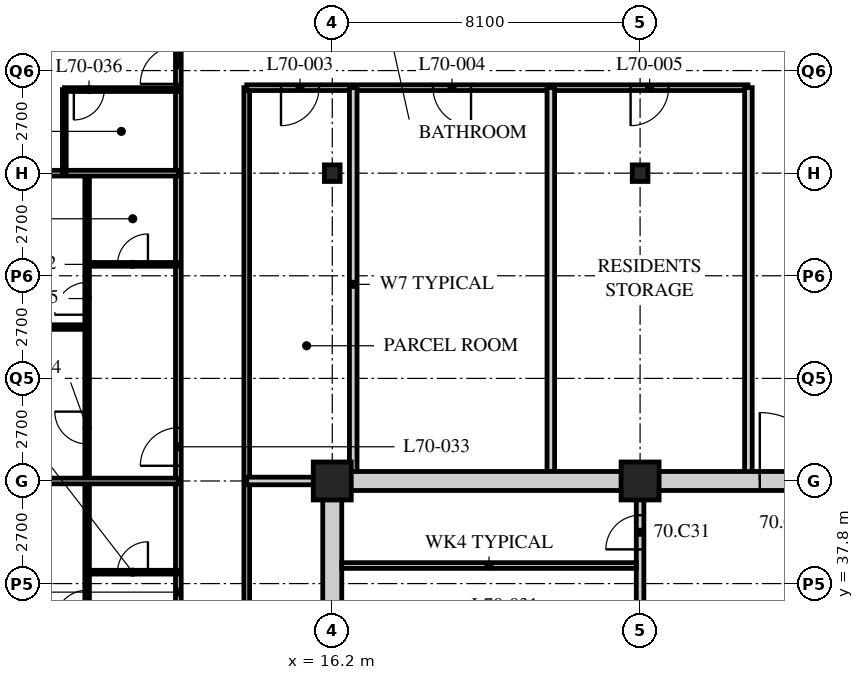
"""IFC4 building model, lengths in metres.
Left out: names, types, materials, properties, quantities, classifications, styles, units other than length and angle.
Written with IfcOpenShell. Run it as: python <this file> out.ifc"""

import sys

from ifc_helpers import new_model, si_unit, direction, frame, frame_2d, origin, origin_2d, place, context, subcontext, project, spatial, rectangle, hollow_rectangle, i_section, extrude, element, fill, save


model = new_model("IFC4")
c1 = context("Model", 3, precision=1e-05, world=origin(), true_north=direction((0.0, 1.0)))
c2 = subcontext(c1, "Body", "Model", "MODEL_VIEW")
j1 = project(units=[si_unit("LENGTHUNIT", "METRE"), si_unit("PLANEANGLEUNIT", "RADIAN")], contexts=[c1])
p1 = place(None, origin())
s1 = spatial("IfcSite", under=j1, at=p1, CompositionType="ELEMENT")
p2 = place(p1, origin())
s2 = spatial("IfcBuilding", under=s1, at=p2, CompositionType="ELEMENT")
p3 = place(p2, frame((0.0, 0.0, 273.6)))
s3 = spatial("IfcBuildingStorey", under=s2, at=p3, CompositionType="ELEMENT", Elevation=273.6)
p4 = place(p3, frame((16.2, 40.5, 0.0), z_axis=(0.0, 0.0, 1.0), x_axis=(1.0, 0.0, 0.0)))
e1 = element("IfcColumn", 1, at=p4, inside=s3, PredefinedType="COLUMN", context=c2, shape_type="SweptSolid", body=[
    extrude(hollow_rectangle(XDim=1.0, YDim=1.0, WallThickness=0.1, at=origin_2d()), origin(), (0.0, 0.0, 1.0), 3.9),
])
p5 = place(p3, frame((16.2, 48.6, 0.0), z_axis=(0.0, 0.0, 1.0), x_axis=(1.0, 0.0, 0.0)))
e2 = element("IfcColumn", 2, at=p5, inside=s3, PredefinedType="COLUMN", context=c2, shape_type="SweptSolid", body=[
    extrude(i_section(OverallWidth=0.412, OverallDepth=0.437, WebThickness=0.036, FlangeThickness=0.058, FilletRadius=0.015, at=origin_2d()), origin(), (0.0, 0.0, 1.0), 3.9),
])
p6 = place(p3, frame((24.3, 40.5, 0.0), z_axis=(0.0, 0.0, 1.0), x_axis=(1.0, 0.0, 0.0)))
e3 = element("IfcColumn", 3, at=p6, inside=s3, PredefinedType="COLUMN", context=c2, shape_type="SweptSolid", body=[
    extrude(hollow_rectangle(XDim=1.0, YDim=1.0, WallThickness=0.1, at=origin_2d()), origin(), (0.0, 0.0, 1.0), 3.9),
])
p7 = place(p3, frame((24.3, 48.6, 0.0), z_axis=(0.0, 0.0, 1.0), x_axis=(1.0, 0.0, 0.0)))
e4 = element("IfcColumn", 4, at=p7, inside=s3, PredefinedType="COLUMN", context=c2, shape_type="SweptSolid", body=[
    extrude(i_section(OverallWidth=0.412, OverallDepth=0.437, WebThickness=0.036, FlangeThickness=0.058, FilletRadius=0.015, at=origin_2d()), origin(), (0.0, 0.0, 1.0), 3.9),
])
p8 = place(p3, frame((12.15, 22.5, 0.0), z_axis=(0.0, 0.0, 1.0), x_axis=(0.0, 1.0, 0.0)))
e5 = element("IfcWall", 5, at=p8, inside=s3, PredefinedType="PARTITIONING", context=c2, shape_type="SweptSolid", body=[
    extrude(rectangle(XDim=30.15, YDim=0.15, at=frame_2d((15.075, 0.0))), origin(), (0.0, 0.0, 1.0), 3.69),
])
p9 = place(p8, frame((0.4, 0.0, 0.0)))
e6 = element("IfcOpeningElement", 6, at=p9, cuts=e5, PredefinedType="OPENING", context=c2, shape_type="SweptSolid", body=[
    extrude(rectangle(XDim=1.0, YDim=2.1, at=frame_2d((0.5, 1.05))), frame((0.0, 0.085, 0.0), z_axis=(0.0, -1.0, 0.0), x_axis=(1.0, 0.0, 0.0)), (0.0, 0.0, 1.0), 0.17),
])
p10 = place(p8, frame((18.4, 0.0, 0.0)))
e7 = element("IfcOpeningElement", 7, at=p10, cuts=e5, PredefinedType="OPENING", context=c2, shape_type="SweptSolid", body=[
    extrude(rectangle(XDim=1.0, YDim=2.1, at=frame_2d((0.5, 1.05))), frame((0.0, 0.085, 0.0), z_axis=(0.0, -1.0, 0.0), x_axis=(1.0, 0.0, 0.0)), (0.0, 0.0, 1.0), 0.17),
])
p11 = place(p8, frame((28.45, 0.0, 0.0)))
e8 = element("IfcOpeningElement", 8, at=p11, cuts=e5, PredefinedType="OPENING", context=c2, shape_type="SweptSolid", body=[
    extrude(rectangle(XDim=1.0, YDim=2.1, at=frame_2d((0.5, 1.05))), frame((0.0, 0.085, 0.0), z_axis=(0.0, -1.0, 0.0), x_axis=(1.0, 0.0, 0.0)), (0.0, 0.0, 1.0), 0.17),
])
p12 = place(p3, frame((13.95, 24.3, 0.0), z_axis=(0.0, 0.0, 1.0), x_axis=(0.0, 1.0, 0.0)))
e9 = element("IfcWall", 9, at=p12, inside=s3, PredefinedType="PARTITIONING", context=c2, shape_type="SweptSolid", body=[
    extrude(rectangle(XDim=26.55, YDim=0.15, at=frame_2d((13.275, 0.0))), origin(), (0.0, 0.0, 1.0), 3.69),
])
p13 = place(p12, frame((3.55, 0.0, 0.0)))
e10 = element("IfcOpeningElement", 10, at=p13, cuts=e9, PredefinedType="OPENING", context=c2, shape_type="SweptSolid", body=[
    extrude(rectangle(XDim=1.0, YDim=2.1, at=frame_2d((0.5, 1.05))), frame((0.0, 0.085, 0.0), z_axis=(0.0, -1.0, 0.0), x_axis=(1.0, 0.0, 0.0)), (0.0, 0.0, 1.0), 0.17),
])
p14 = place(p12, frame((11.65, 0.0, 0.0)))
e11 = element("IfcOpeningElement", 11, at=p14, cuts=e9, PredefinedType="OPENING", context=c2, shape_type="SweptSolid", body=[
    extrude(rectangle(XDim=1.0, YDim=2.1, at=frame_2d((0.5, 1.05))), frame((0.0, 0.085, 0.0), z_axis=(0.0, -1.0, 0.0), x_axis=(1.0, 0.0, 0.0)), (0.0, 0.0, 1.0), 0.17),
])
p15 = place(p3, frame((13.95, 50.85, 0.0), z_axis=(0.0, 0.0, 1.0), x_axis=(1.0, 0.0, 0.0)))
e12 = element("IfcWall", 12, at=p15, inside=s3, PredefinedType="PARTITIONING", context=c2, shape_type="SweptSolid", body=[
    extrude(rectangle(XDim=13.19, YDim=0.15, at=frame_2d((6.595, 0.0))), origin(), (0.0, 0.0, 1.0), 3.69),
])
p16 = place(p15, frame((0.901, 0.0, 0.0)))
e13 = element("IfcOpeningElement", 13, at=p16, cuts=e12, PredefinedType="OPENING", context=c2, shape_type="SweptSolid", body=[
    extrude(rectangle(XDim=1.0, YDim=2.1, at=frame_2d((0.5, 1.05))), frame((0.0, 0.085, 0.0), z_axis=(0.0, -1.0, 0.0), x_axis=(1.0, 0.0, 0.0)), (0.0, 0.0, 1.0), 0.17),
])
p17 = place(p15, frame((4.901, 0.0, 0.0)))
e14 = element("IfcOpeningElement", 14, at=p17, cuts=e12, PredefinedType="OPENING", context=c2, shape_type="SweptSolid", body=[
    extrude(rectangle(XDim=1.0, YDim=2.1, at=frame_2d((0.5, 1.05))), frame((0.0, 0.085, 0.0), z_axis=(0.0, -1.0, 0.0), x_axis=(1.0, 0.0, 0.0)), (0.0, 0.0, 1.0), 0.17),
])
p18 = place(p15, frame((10.101, 0.0, 0.0)))
e15 = element("IfcOpeningElement", 15, at=p18, cuts=e12, PredefinedType="OPENING", context=c2, shape_type="SweptSolid", body=[
    extrude(rectangle(XDim=1.0, YDim=2.1, at=frame_2d((0.5, 1.05))), frame((0.0, 0.085, 0.0), z_axis=(0.0, -1.0, 0.0), x_axis=(1.0, 0.0, 0.0)), (0.0, 0.0, 1.0), 0.17),
])
for number, where, z_axis, x_axis in (
    (16, (16.752, 50.85, 0.0), (0.0, 0.0, 1.0), (0.0, -1.0, 0.0)),
    (17, (21.951, 50.85, 0.0), (0.0, 0.0, 1.0), (0.0, -1.0, 0.0)),
    (18, (27.15, 40.5, 0.0), (0.0, 0.0, 1.0), (0.0, 1.0, 0.0)),
):
    element("IfcWall", number, at=place(p3, frame(where, z_axis=z_axis, x_axis=x_axis)), inside=s3, PredefinedType="SOLIDWALL", context=c2, shape_type="SweptSolid", body=[
        extrude(rectangle(XDim=10.35, YDim=0.2, at=frame_2d((5.175, 0.0))), origin(), (0.0, 0.0, 1.0), 3.69),
    ])
p19 = place(p3, frame((13.95, 40.5, 0.0), z_axis=(0.0, 0.0, 1.0), x_axis=(1.0, 0.0, 0.0)))
e19 = element("IfcWall", 19, at=p19, inside=s3, PredefinedType="SOLIDWALL", context=c2, shape_type="SweptSolid", body=[
    extrude(rectangle(XDim=2.25, YDim=0.2, at=frame_2d((1.125, 0.0))), origin(), (0.0, 0.0, 1.0), 3.078),
])
p20 = place(p3, frame((9.75, 22.5, 0.0), z_axis=(0.0, 0.0, 1.0), x_axis=(0.0, 1.0, 0.0)))
e20 = element("IfcWall", 20, at=p20, inside=s3, PredefinedType="PARTITIONING", context=c2, shape_type="SweptSolid", body=[
    extrude(rectangle(XDim=26.1, YDim=0.12, at=frame_2d((13.05, 0.0))), origin(), (0.0, 0.0, 1.0), 3.69),
])
p21 = place(p20, frame((0.975, 0.0, 0.0)))
e21 = element("IfcOpeningElement", 21, at=p21, cuts=e20, PredefinedType="OPENING", context=c2, shape_type="SweptSolid", body=[
    extrude(rectangle(XDim=0.85, YDim=2.1, at=frame_2d((0.425, 1.05))), frame((0.0, 0.07, 0.0), z_axis=(0.0, -1.0, 0.0), x_axis=(1.0, 0.0, 0.0)), (0.0, 0.0, 1.0), 0.14),
])
p22 = place(p20, frame((10.225, 0.0, 0.0)))
e22 = element("IfcOpeningElement", 22, at=p22, cuts=e20, PredefinedType="OPENING", context=c2, shape_type="SweptSolid", body=[
    extrude(rectangle(XDim=0.85, YDim=2.1, at=frame_2d((0.425, 1.05))), frame((0.0, 0.07, 0.0), z_axis=(0.0, -1.0, 0.0), x_axis=(1.0, 0.0, 0.0)), (0.0, 0.0, 1.0), 0.14),
])
p23 = place(p20, frame((14.275, 0.0, 0.0)))
e23 = element("IfcOpeningElement", 23, at=p23, cuts=e20, PredefinedType="OPENING", context=c2, shape_type="SweptSolid", body=[
    extrude(rectangle(XDim=0.85, YDim=2.1, at=frame_2d((0.425, 1.05))), frame((0.0, 0.07, 0.0), z_axis=(0.0, -1.0, 0.0), x_axis=(1.0, 0.0, 0.0)), (0.0, 0.0, 1.0), 0.14),
])
p24 = place(p20, frame((18.975, 0.0, 0.0)))
e24 = element("IfcOpeningElement", 24, at=p24, cuts=e20, PredefinedType="OPENING", context=c2, shape_type="SweptSolid", body=[
    extrude(rectangle(XDim=0.85, YDim=2.1, at=frame_2d((0.425, 1.05))), frame((0.0, 0.07, 0.0), z_axis=(0.0, -1.0, 0.0), x_axis=(1.0, 0.0, 0.0)), (0.0, 0.0, 1.0), 0.14),
])
p25 = place(p20, frame((22.375, 0.0, 0.0)))
e25 = element("IfcOpeningElement", 25, at=p25, cuts=e20, PredefinedType="OPENING", context=c2, shape_type="SweptSolid", body=[
    extrude(rectangle(XDim=0.85, YDim=2.1, at=frame_2d((0.425, 1.05))), frame((0.0, 0.07, 0.0), z_axis=(0.0, -1.0, 0.0), x_axis=(1.0, 0.0, 0.0)), (0.0, 0.0, 1.0), 0.14),
])
p26 = place(p3, frame((12.15, 38.1, 0.0), z_axis=(0.0, 0.0, 1.0), x_axis=(-1.0, 0.0, 0.0)))
e26 = element("IfcWall", 26, at=p26, inside=s3, PredefinedType="PARTITIONING", context=c2, shape_type="SweptSolid", body=[
    extrude(rectangle(XDim=2.4, YDim=0.1, at=frame_2d((1.2, 0.0))), origin(), (0.0, 0.0, 1.0), 3.69),
])
p27 = place(p26, frame((0.8, 0.0, 0.0)))
e27 = element("IfcOpeningElement", 27, at=p27, cuts=e26, PredefinedType="OPENING", context=c2, shape_type="SweptSolid", body=[
    extrude(rectangle(XDim=0.8, YDim=2.1, at=frame_2d((0.4, 1.05))), frame((0.0, 0.06, 0.0), z_axis=(0.0, -1.0, 0.0), x_axis=(1.0, 0.0, 0.0)), (0.0, 0.0, 1.0), 0.12),
])
p28 = place(p3, frame((12.15, 40.5, 0.0), z_axis=(0.0, 0.0, 1.0), x_axis=(-1.0, 0.0, 0.0)))
e28 = element("IfcWall", 28, at=p28, inside=s3, PredefinedType="PARTITIONING", context=c2, shape_type="SweptSolid", body=[
    extrude(rectangle(XDim=11.85, YDim=0.15, at=frame_2d((5.925, 0.0))), origin(), (0.0, 0.0, 1.0), 3.078),
])
p29 = place(p3, frame((12.15, 46.2, 0.0), z_axis=(0.0, 0.0, 1.0), x_axis=(-1.0, 0.0, 0.0)))
e29 = element("IfcWall", 29, at=p29, inside=s3, PredefinedType="PARTITIONING", context=c2, shape_type="SweptSolid", body=[
    extrude(rectangle(XDim=2.4, YDim=0.1, at=frame_2d((1.2, 0.0))), origin(), (0.0, 0.0, 1.0), 3.69),
])
p30 = place(p29, frame((0.8, 0.0, 0.0)))
e30 = element("IfcOpeningElement", 30, at=p30, cuts=e29, PredefinedType="OPENING", context=c2, shape_type="SweptSolid", body=[
    extrude(rectangle(XDim=0.8, YDim=2.1, at=frame_2d((0.4, 1.05))), frame((0.0, 0.06, 0.0), z_axis=(0.0, -1.0, 0.0), x_axis=(1.0, 0.0, 0.0)), (0.0, 0.0, 1.0), 0.12),
])
p31 = place(p3, frame((9.75, 44.55, 0.0), z_axis=(0.0, 0.0, 1.0), x_axis=(-1.0, 0.0, 0.0)))
e31 = element("IfcWall", 31, at=p31, inside=s3, PredefinedType="PARTITIONING", context=c2, shape_type="SweptSolid", body=[
    extrude(rectangle(XDim=9.45, YDim=0.12, at=frame_2d((4.725, 0.0))), origin(), (0.0, 0.0, 1.0), 3.69),
])
p32 = place(p3, frame((12.15, 48.6, 0.0), z_axis=(0.0, 0.0, 1.0), x_axis=(-1.0, 0.0, 0.0)))
e32 = element("IfcWall", 32, at=p32, inside=s3, PredefinedType="PARTITIONING", context=c2, shape_type="SweptSolid", body=[
    extrude(rectangle(XDim=11.85, YDim=0.15, at=frame_2d((5.925, 0.0))), origin(), (0.0, 0.0, 1.0), 3.078),
])
p33 = place(p3, frame((9.15, 48.6, 0.0), z_axis=(0.0, 0.0, 1.0), x_axis=(0.0, 1.0, 0.0)))
e33 = element("IfcWall", 33, at=p33, inside=s3, PredefinedType="PARTITIONING", context=c2, shape_type="SweptSolid", body=[
    extrude(rectangle(XDim=2.2, YDim=0.1, at=frame_2d((1.1, 0.0))), origin(), (0.0, 0.0, 1.0), 3.69),
])
p34 = place(p3, frame((12.15, 50.8, 0.0), z_axis=(0.0, 0.0, 1.0), x_axis=(-1.0, 0.0, 0.0)))
e34 = element("IfcWall", 34, at=p34, inside=s3, PredefinedType="PARTITIONING", context=c2, shape_type="SweptSolid", body=[
    extrude(rectangle(XDim=3.0, YDim=0.1, at=frame_2d((1.5, 0.0))), origin(), (0.0, 0.0, 1.0), 3.69),
])
p35 = place(p34, frame((1.95, 0.0, 0.0)))
e35 = element("IfcOpeningElement", 35, at=p35, cuts=e34, PredefinedType="OPENING", context=c2, shape_type="SweptSolid", body=[
    extrude(rectangle(XDim=0.8, YDim=2.1, at=frame_2d((0.4, 1.05))), frame((0.0, 0.06, 0.0), z_axis=(0.0, -1.0, 0.0), x_axis=(1.0, 0.0, 0.0)), (0.0, 0.0, 1.0), 0.12),
])
p36 = place(p3, frame((15.95, 40.5, 0.0), z_axis=(0.0, 0.0, 1.0), x_axis=(1.0, 0.0, 0.0)))
e36 = element("IfcWall", 36, at=p36, inside=s3, PredefinedType="SOLIDWALL", context=c2, shape_type="SweptSolid", body=[
    extrude(rectangle(XDim=24.55, YDim=0.5, at=frame_2d((12.275, 0.0))), origin(), (0.0, 0.0, 1.0), 3.04),
])
p37 = place(p36, frame((11.5, 0.0, 0.0)))
e37 = element("IfcOpeningElement", 37, at=p37, cuts=e36, PredefinedType="OPENING", context=c2, shape_type="SweptSolid", body=[
    extrude(rectangle(XDim=1.8, YDim=2.4, at=frame_2d((0.9, 1.2))), frame((0.0, 0.26, 0.0), z_axis=(0.0, -1.0, 0.0), x_axis=(1.0, 0.0, 0.0)), (0.0, 0.0, 1.0), 0.52),
])
p38 = place(p3, frame((16.2, 24.55, 0.0), z_axis=(0.0, 0.0, 1.0), x_axis=(0.0, 1.0, 0.0)))
e38 = element("IfcWall", 38, at=p38, inside=s3, PredefinedType="SOLIDWALL", context=c2, shape_type="SweptSolid", body=[
    extrude(rectangle(XDim=15.7, YDim=0.5, at=frame_2d((7.85, 0.0))), origin(), (0.0, 0.0, 1.0), 3.078),
])
p39 = place(p3, frame((24.3, 32.5, 0.0), z_axis=(0.0, 0.0, 1.0), x_axis=(0.0, 1.0, 0.0)))
e39 = element("IfcWall", 39, at=p39, inside=s3, PredefinedType="PARTITIONING", context=c2, shape_type="SweptSolid", body=[
    extrude(rectangle(XDim=7.75, YDim=0.2, at=frame_2d((3.875, 0.0))), origin(), (0.0, 0.0, 1.0), 3.078),
])
p40 = place(p39, frame((2.4, 0.0, 0.0)))
e40 = element("IfcOpeningElement", 40, at=p40, cuts=e39, PredefinedType="OPENING", context=c2, shape_type="SweptSolid", body=[
    extrude(rectangle(XDim=0.9, YDim=2.1, at=frame_2d((0.45, 1.05))), frame((0.0, 0.11, 0.0), z_axis=(0.0, -1.0, 0.0), x_axis=(1.0, 0.0, 0.0)), (0.0, 0.0, 1.0), 0.22),
])
p41 = place(p39, frame((6.2, 0.0, 0.0)))
e41 = element("IfcOpeningElement", 41, at=p41, cuts=e39, PredefinedType="OPENING", context=c2, shape_type="SweptSolid", body=[
    extrude(rectangle(XDim=0.9, YDim=2.1, at=frame_2d((0.45, 1.05))), frame((0.0, 0.11, 0.0), z_axis=(0.0, -1.0, 0.0), x_axis=(1.0, 0.0, 0.0)), (0.0, 0.0, 1.0), 0.22),
])
p42 = place(p3, frame((16.45, 38.275, 0.0), z_axis=(0.0, 0.0, 1.0), x_axis=(1.0, 0.0, 0.0)))
e42 = element("IfcWall", 42, at=p42, inside=s3, PredefinedType="PARTITIONING", context=c2, shape_type="SweptSolid", body=[
    extrude(rectangle(XDim=7.75, YDim=0.15, at=frame_2d((3.875, 0.0))), origin(), (0.0, 0.0, 1.0), 3.69),
])
p43 = place(p16, origin())
e43 = element("IfcDoor", 43, at=p43, inside=s3, OperationType="SINGLE_SWING_RIGHT", PredefinedType="DOOR", context=c2, shape_type="SweptSolid", body=[
    extrude(rectangle(XDim=1.0, YDim=2.1, at=frame_2d((0.5, 1.05))), frame((0.0, 0.025, 0.0), z_axis=(0.0, -1.0, 0.0), x_axis=(1.0, 0.0, 0.0)), (0.0, 0.0, 1.0), 0.05),
])
fill(e13, e43)
p44 = place(p17, origin())
e44 = element("IfcDoor", 44, at=p44, inside=s3, OperationType="SINGLE_SWING_LEFT", PredefinedType="DOOR", context=c2, shape_type="SweptSolid", body=[
    extrude(rectangle(XDim=1.0, YDim=2.1, at=frame_2d((0.5, 1.05))), frame((0.0, 0.025, 0.0), z_axis=(0.0, -1.0, 0.0), x_axis=(1.0, 0.0, 0.0)), (0.0, 0.0, 1.0), 0.05),
])
fill(e14, e44)
p45 = place(p18, origin())
e45 = element("IfcDoor", 45, at=p45, inside=s3, OperationType="SINGLE_SWING_RIGHT", PredefinedType="DOOR", context=c2, shape_type="SweptSolid", body=[
    extrude(rectangle(XDim=1.0, YDim=2.1, at=frame_2d((0.5, 1.05))), frame((0.0, 0.025, 0.0), z_axis=(0.0, -1.0, 0.0), x_axis=(1.0, 0.0, 0.0)), (0.0, 0.0, 1.0), 0.05),
])
fill(e15, e45)
p46 = place(p27, origin())
e46 = element("IfcDoor", 46, at=p46, inside=s3, OperationType="SINGLE_SWING_RIGHT", PredefinedType="DOOR", context=c2, shape_type="SweptSolid", body=[
    extrude(rectangle(XDim=0.8, YDim=2.1, at=frame_2d((0.4, 1.05))), frame((0.0, 0.025, 0.0), z_axis=(0.0, -1.0, 0.0), x_axis=(1.0, 0.0, 0.0)), (0.0, 0.0, 1.0), 0.05),
])
fill(e27, e46)
p47 = place(p23, origin())
e47 = element("IfcDoor", 47, at=p47, inside=s3, OperationType="SINGLE_SWING_LEFT", PredefinedType="DOOR", context=c2, shape_type="SweptSolid", body=[
    extrude(rectangle(XDim=0.85, YDim=2.1, at=frame_2d((0.425, 1.05))), frame((0.0, 0.025, 0.0), z_axis=(0.0, -1.0, 0.0), x_axis=(1.0, 0.0, 0.0)), (0.0, 0.0, 1.0), 0.05),
])
fill(e23, e47)
p48 = place(p30, origin())
e48 = element("IfcDoor", 48, at=p48, inside=s3, OperationType="SINGLE_SWING_RIGHT", PredefinedType="DOOR", context=c2, shape_type="SweptSolid", body=[
    extrude(rectangle(XDim=0.8, YDim=2.1, at=frame_2d((0.4, 1.05))), frame((0.0, 0.025, 0.0), z_axis=(0.0, -1.0, 0.0), x_axis=(1.0, 0.0, 0.0)), (0.0, 0.0, 1.0), 0.05),
])
fill(e30, e48)
p49 = place(p10, origin())
e49 = element("IfcDoor", 49, at=p49, inside=s3, OperationType="SINGLE_SWING_LEFT", PredefinedType="DOOR", context=c2, shape_type="SweptSolid", body=[
    extrude(rectangle(XDim=1.0, YDim=2.1, at=frame_2d((0.5, 1.05))), frame((0.0, 0.025, 0.0), z_axis=(0.0, -1.0, 0.0), x_axis=(1.0, 0.0, 0.0)), (0.0, 0.0, 1.0), 0.05),
])
fill(e7, e49)
p50 = place(p24, origin())
e50 = element("IfcDoor", 50, at=p50, inside=s3, OperationType="SINGLE_SWING_RIGHT", PredefinedType="DOOR", context=c2, shape_type="SweptSolid", body=[
    extrude(rectangle(XDim=0.85, YDim=2.1, at=frame_2d((0.425, 1.05))), frame((0.0, 0.025, 0.0), z_axis=(0.0, -1.0, 0.0), x_axis=(1.0, 0.0, 0.0)), (0.0, 0.0, 1.0), 0.05),
])
fill(e24, e50)
p51 = place(p25, origin())
e51 = element("IfcDoor", 51, at=p51, inside=s3, OperationType="SINGLE_SWING_LEFT", PredefinedType="DOOR", context=c2, shape_type="SweptSolid", body=[
    extrude(rectangle(XDim=0.85, YDim=2.1, at=frame_2d((0.425, 1.05))), frame((0.0, 0.025, 0.0), z_axis=(0.0, -1.0, 0.0), x_axis=(1.0, 0.0, 0.0)), (0.0, 0.0, 1.0), 0.05),
])
fill(e25, e51)
p52 = place(p35, origin())
e52 = element("IfcDoor", 52, at=p52, inside=s3, OperationType="SINGLE_SWING_RIGHT", PredefinedType="DOOR", context=c2, shape_type="SweptSolid", body=[
    extrude(rectangle(XDim=0.8, YDim=2.1, at=frame_2d((0.4, 1.05))), frame((0.0, 0.025, 0.0), z_axis=(0.0, -1.0, 0.0), x_axis=(1.0, 0.0, 0.0)), (0.0, 0.0, 1.0), 0.05),
])
fill(e35, e52)
p53 = place(p11, origin())
e53 = element("IfcDoor", 53, at=p53, inside=s3, OperationType="SINGLE_SWING_LEFT", PredefinedType="DOOR", context=c2, shape_type="SweptSolid", body=[
    extrude(rectangle(XDim=1.0, YDim=2.1, at=frame_2d((0.5, 1.05))), frame((0.0, 0.025, 0.0), z_axis=(0.0, -1.0, 0.0), x_axis=(1.0, 0.0, 0.0)), (0.0, 0.0, 1.0), 0.05),
])
fill(e8, e53)
p54 = place(p41, origin())
e54 = element("IfcDoor", 54, at=p54, inside=s3, OperationType="SINGLE_SWING_LEFT", PredefinedType="DOOR", context=c2, shape_type="SweptSolid", body=[
    extrude(rectangle(XDim=0.9, YDim=2.1, at=frame_2d((0.45, 1.05))), frame((0.0, 0.025, 0.0), z_axis=(0.0, -1.0, 0.0), x_axis=(1.0, 0.0, 0.0)), (0.0, 0.0, 1.0), 0.05),
])
fill(e41, e54)
p55 = place(p37, origin())
e55 = element("IfcDoor", 55, at=p55, inside=s3, OperationType="DOUBLE_DOOR_SINGLE_SWING", PredefinedType="DOOR", context=c2, shape_type="SweptSolid", body=[
    extrude(rectangle(XDim=1.8, YDim=2.4, at=frame_2d((0.9, 1.2))), frame((0.0, 0.025, 0.0), z_axis=(0.0, -1.0, 0.0), x_axis=(1.0, 0.0, 0.0)), (0.0, 0.0, 1.0), 0.05),
])
fill(e37, e55)
save(model, sys.argv[1])
